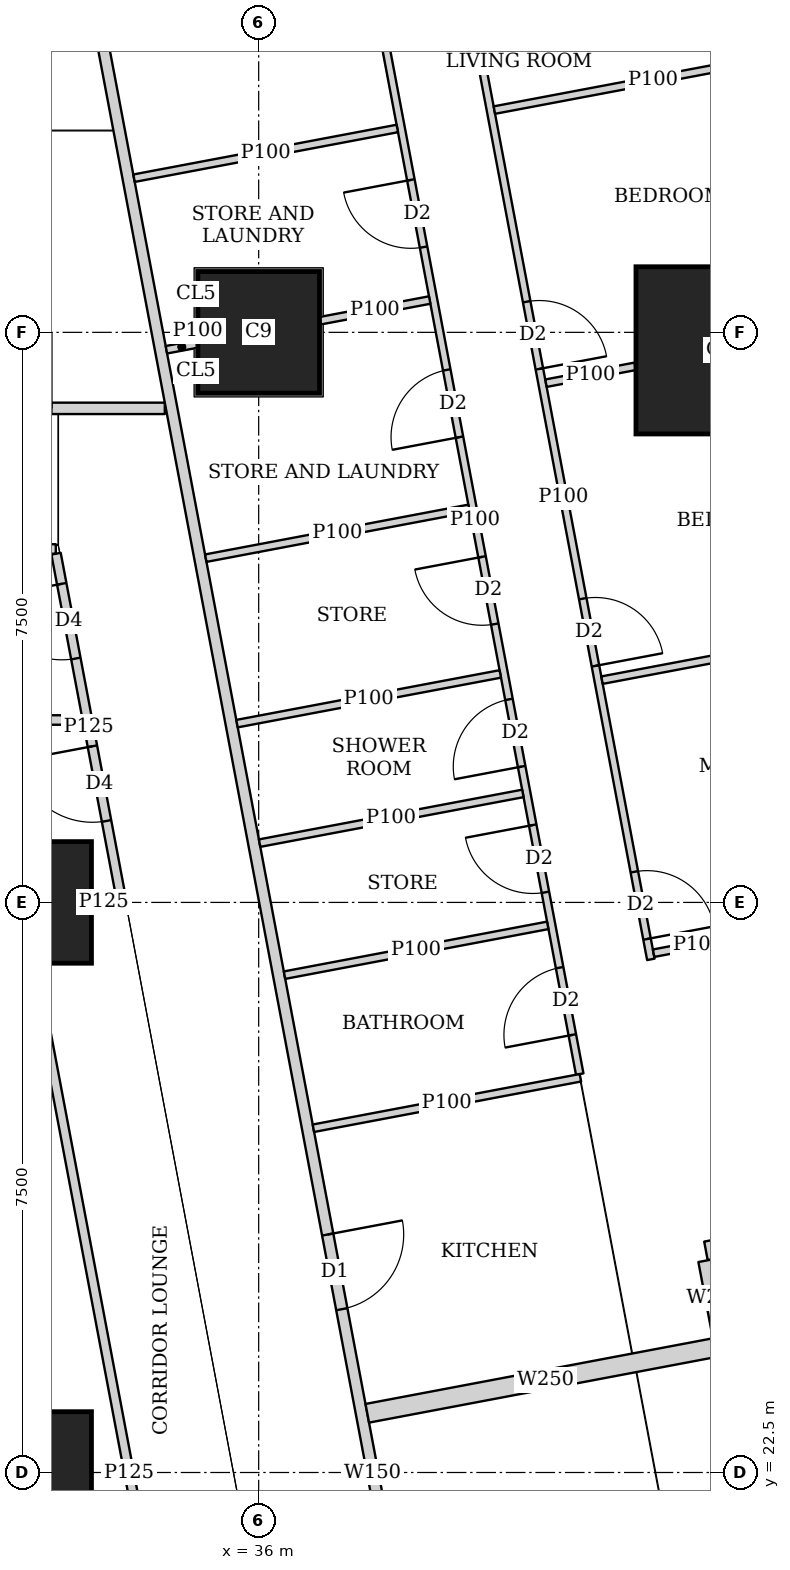
"""IFC4 building model, lengths in metres.
Left out: names, types, materials, properties, quantities, classifications, styles, units other than length and angle.
Written with IfcOpenShell. Run it as: python <this file> out.ifc"""

import sys

from ifc_helpers import new_model, si_unit, direction, frame, frame_2d, origin, origin_2d, place, context, subcontext, project, spatial, rectangle, extrude, element, fill, save


model = new_model("IFC4")
c1 = context("Model", 3, precision=1e-05, world=origin(), true_north=direction((0.0, 1.0)))
c2 = subcontext(c1, "Body", "Model", "MODEL_VIEW")
j1 = project(units=[si_unit("LENGTHUNIT", "METRE"), si_unit("PLANEANGLEUNIT", "RADIAN")], contexts=[c1])
p1 = place(None, origin())
s1 = spatial("IfcSite", under=j1, at=p1, CompositionType="ELEMENT")
p2 = place(p1, origin())
s2 = spatial("IfcBuilding", under=s1, at=p2, CompositionType="ELEMENT")
p3 = place(p2, frame((0.0, 0.0, 111.65)))
s3 = spatial("IfcBuildingStorey", under=s2, at=p3, CompositionType="ELEMENT", Elevation=111.65)
for number, where, z_axis, x_axis in (
    (1, (33.0, 22.5, 0.0), (0.0, 0.0, 1.0), (1.0, 0.0, 0.0)),
    (2, (33.0, 30.0, 0.0), (0.0, 0.0, 1.0), (1.0, 0.0, 0.0)),
    (3, (36.0, 37.5, 0.0), (0.0, 0.0, 1.0), (1.0, 0.0, 0.0)),
):
    element("IfcColumn", number, at=place(p3, frame(where, z_axis=z_axis, x_axis=x_axis)), inside=s3, PredefinedType="COLUMN", context=c2, shape_type="SweptSolid", body=[
        extrude(rectangle(XDim=1.6, YDim=1.6, at=origin_2d()), origin(), (0.0, 0.0, 1.0), 3.75),
    ])
p4 = place(p3, frame((42.064, 37.263, 0.0), z_axis=(0.0, 0.0, 1.0), x_axis=(1.0, 0.0, 0.0)))
e4 = element("IfcColumn", 4, at=p4, inside=s3, PredefinedType="COLUMN", context=c2, shape_type="SweptSolid", body=[
    extrude(rectangle(XDim=2.2, YDim=2.2, at=origin_2d()), origin(), (0.0, 0.0, 1.0), 3.75),
])
p5 = place(p3, frame((8.35, 36.5, 0.0), z_axis=(0.0, 0.0, 1.0), x_axis=(1.0, 0.0, 0.0)))
e5 = element("IfcWall", 5, at=p5, inside=s3, PredefinedType="SOLIDWALL", context=c2, shape_type="SweptSolid", body=[
    extrude(rectangle(XDim=26.415, YDim=0.15, at=frame_2d((13.208, 0.0))), origin(), (0.0, 0.0, 1.0), 3.5),
])
p6 = place(p5, frame((2.6, 0.0, 0.0)))
e6 = element("IfcOpeningElement", 6, at=p6, cuts=e5, PredefinedType="OPENING", context=c2, shape_type="SweptSolid", body=[
    extrude(rectangle(XDim=1.0, YDim=2.1, at=frame_2d((0.5, 1.05))), frame((0.0, 0.085, 0.0), z_axis=(0.0, -1.0, 0.0), x_axis=(1.0, 0.0, 0.0)), (0.0, 0.0, 1.0), 0.17),
])
p7 = place(p5, frame((10.949, 0.0, 0.0)))
e7 = element("IfcOpeningElement", 7, at=p7, cuts=e5, PredefinedType="OPENING", context=c2, shape_type="SweptSolid", body=[
    extrude(rectangle(XDim=1.0, YDim=2.1, at=frame_2d((0.5, 1.05))), frame((0.0, 0.085, 0.0), z_axis=(0.0, -1.0, 0.0), x_axis=(1.0, 0.0, 0.0)), (0.0, 0.0, 1.0), 0.17),
])
p8 = place(p5, frame((23.923, 0.0, 0.0)))
e8 = element("IfcOpeningElement", 8, at=p8, cuts=e5, PredefinedType="OPENING", context=c2, shape_type="SweptSolid", body=[
    extrude(rectangle(XDim=1.0, YDim=2.1, at=frame_2d((0.5, 1.05))), frame((0.0, 0.085, 0.0), z_axis=(0.0, -1.0, 0.0), x_axis=(1.0, 0.0, 0.0)), (0.0, 0.0, 1.0), 0.17),
])
p9 = place(p3, frame((33.127, 45.65, 0.0), z_axis=(0.0, 0.0, 1.0), x_axis=(0.185598547723, -0.98262565562, 0.0)))
e9 = element("IfcWall", 9, at=p9, inside=s3, PredefinedType="SOLIDWALL", context=c2, shape_type="SweptSolid", body=[
    extrude(rectangle(XDim=47.118, YDim=0.15, at=frame_2d((23.559, 0.0))), origin(), (0.0, 0.0, 1.0), 2.2),
])
p10 = place(p9, frame((20.373, 0.0, 0.0)))
e10 = element("IfcOpeningElement", 10, at=p10, cuts=e9, PredefinedType="OPENING", context=c2, shape_type="SweptSolid", body=[
    extrude(rectangle(XDim=1.0, YDim=2.1, at=frame_2d((0.5, 1.05))), frame((0.0, 0.085, 0.0), z_axis=(0.0, -1.0, 0.0), x_axis=(1.0, 0.0, 0.0)), (0.0, 0.0, 1.0), 0.17),
])
p11 = place(p9, frame((24.188, 0.0, 0.0)))
e11 = element("IfcOpeningElement", 11, at=p11, cuts=e9, PredefinedType="OPENING", context=c2, shape_type="SweptSolid", body=[
    extrude(rectangle(XDim=1.0, YDim=2.1, at=frame_2d((0.5, 1.05))), frame((0.0, 0.085, 0.0), z_axis=(0.0, -1.0, 0.0), x_axis=(1.0, 0.0, 0.0)), (0.0, 0.0, 1.0), 0.17),
])
p12 = place(p9, frame((32.608, 0.0, 0.0)))
e12 = element("IfcOpeningElement", 12, at=p12, cuts=e9, PredefinedType="OPENING", context=c2, shape_type="SweptSolid", body=[
    extrude(rectangle(XDim=1.0, YDim=2.1, at=frame_2d((0.5, 1.05))), frame((0.0, 0.085, 0.0), z_axis=(0.0, -1.0, 0.0), x_axis=(1.0, 0.0, 0.0)), (0.0, 0.0, 1.0), 0.17),
])
p13 = place(p3, frame((38.862, 41.42, 0.0), z_axis=(0.0, 0.0, 1.0), x_axis=(0.185550092293, -0.982634806655, 0.0)))
e13 = element("IfcWall", 13, at=p13, inside=s3, PredefinedType="PARTITIONING", context=c2, shape_type="SweptSolid", body=[
    extrude(rectangle(XDim=12.384, YDim=0.1, at=frame_2d((6.192, 0.0))), origin(), (0.0, 0.0, 1.0), 2.5),
])
p14 = place(p13, frame((11.212, 0.0, 0.0)))
e14 = element("IfcOpeningElement", 14, at=p14, cuts=e13, PredefinedType="OPENING", context=c2, shape_type="SweptSolid", body=[
    extrude(rectangle(XDim=0.9, YDim=2.1, at=frame_2d((0.45, 1.05))), frame((0.0, 0.06, 0.0), z_axis=(0.0, -1.0, 0.0), x_axis=(1.0, 0.0, 0.0)), (0.0, 0.0, 1.0), 0.12),
])
p15 = place(p13, frame((7.555, 0.0, 0.0)))
e15 = element("IfcOpeningElement", 15, at=p15, cuts=e13, PredefinedType="OPENING", context=c2, shape_type="SweptSolid", body=[
    extrude(rectangle(XDim=0.9, YDim=2.1, at=frame_2d((0.45, 1.05))), frame((0.0, 0.06, 0.0), z_axis=(0.0, -1.0, 0.0), x_axis=(1.0, 0.0, 0.0)), (0.0, 0.0, 1.0), 0.12),
])
p16 = place(p13, frame((3.579, 0.0, 0.0)))
e16 = element("IfcOpeningElement", 16, at=p16, cuts=e13, PredefinedType="OPENING", context=c2, shape_type="SweptSolid", body=[
    extrude(rectangle(XDim=0.9, YDim=2.1, at=frame_2d((0.45, 1.05))), frame((0.0, 0.06, 0.0), z_axis=(0.0, -1.0, 0.0), x_axis=(1.0, 0.0, 0.0)), (0.0, 0.0, 1.0), 0.12),
])
p17 = place(p3, frame((37.473, 42.309, 0.0), z_axis=(0.0, 0.0, 1.0), x_axis=(0.185583982986, -0.982628406499, 0.0)))
e17 = element("IfcWall", 17, at=p17, inside=s3, PredefinedType="PARTITIONING", context=c2, shape_type="SweptSolid", body=[
    extrude(rectangle(XDim=14.825, YDim=0.1, at=frame_2d((7.412, 0.0))), origin(), (0.0, 0.0, 1.0), 2.5),
])
p18 = place(p17, frame((13.4, 0.0, 0.0)))
e18 = element("IfcOpeningElement", 18, at=p18, cuts=e17, PredefinedType="OPENING", context=c2, shape_type="SweptSolid", body=[
    extrude(rectangle(XDim=0.9, YDim=2.1, at=frame_2d((0.45, 1.05))), frame((0.0, 0.06, 0.0), z_axis=(0.0, -1.0, 0.0), x_axis=(1.0, 0.0, 0.0)), (0.0, 0.0, 1.0), 0.12),
])
p19 = place(p17, frame((9.808, 0.0, 0.0)))
e19 = element("IfcOpeningElement", 19, at=p19, cuts=e17, PredefinedType="OPENING", context=c2, shape_type="SweptSolid", body=[
    extrude(rectangle(XDim=0.9, YDim=2.1, at=frame_2d((0.45, 1.05))), frame((0.0, 0.06, 0.0), z_axis=(0.0, -1.0, 0.0), x_axis=(1.0, 0.0, 0.0)), (0.0, 0.0, 1.0), 0.12),
])
p20 = place(p17, frame((5.397, 0.0, 0.0)))
e20 = element("IfcOpeningElement", 20, at=p20, cuts=e17, PredefinedType="OPENING", context=c2, shape_type="SweptSolid", body=[
    extrude(rectangle(XDim=0.9, YDim=2.1, at=frame_2d((0.45, 1.05))), frame((0.0, 0.06, 0.0), z_axis=(0.0, -1.0, 0.0), x_axis=(1.0, 0.0, 0.0)), (0.0, 0.0, 1.0), 0.12),
])
p21 = place(p17, frame((2.853, 0.0, 0.0)))
e21 = element("IfcOpeningElement", 21, at=p21, cuts=e17, PredefinedType="OPENING", context=c2, shape_type="SweptSolid", body=[
    extrude(rectangle(XDim=0.9, YDim=2.1, at=frame_2d((0.45, 1.05))), frame((0.0, 0.06, 0.0), z_axis=(0.0, -1.0, 0.0), x_axis=(1.0, 0.0, 0.0)), (0.0, 0.0, 1.0), 0.12),
])
p22 = place(p17, frame((11.491, 0.0, 0.0)))
e22 = element("IfcOpeningElement", 22, at=p22, cuts=e17, PredefinedType="OPENING", context=c2, shape_type="SweptSolid", body=[
    extrude(rectangle(XDim=0.9, YDim=2.1, at=frame_2d((0.45, 1.05))), frame((0.0, 0.06, 0.0), z_axis=(0.0, -1.0, 0.0), x_axis=(1.0, 0.0, 0.0)), (0.0, 0.0, 1.0), 0.12),
])
p23 = place(p17, frame((7.9, 0.0, 0.0)))
e23 = element("IfcOpeningElement", 23, at=p23, cuts=e17, PredefinedType="OPENING", context=c2, shape_type="SweptSolid", body=[
    extrude(rectangle(XDim=0.9, YDim=2.1, at=frame_2d((0.45, 1.05))), frame((0.0, 0.06, 0.0), z_axis=(0.0, -1.0, 0.0), x_axis=(1.0, 0.0, 0.0)), (0.0, 0.0, 1.0), 0.12),
])
p24 = place(p3, frame((43.277, 41.212, 0.0), z_axis=(0.0, 0.0, 1.0), x_axis=(-0.982665405803, -0.185387972203, 0.0)))
e24 = element("IfcWall", 24, at=p24, inside=s3, PredefinedType="PARTITIONING", context=c2, shape_type="SweptSolid", body=[
    extrude(rectangle(XDim=4.25, YDim=0.1, at=frame_2d((2.125, 0.0))), origin(), (0.0, 0.0, 1.0), 2.05),
])
p25 = place(p3, frame((40.954, 37.053, 0.0), z_axis=(0.0, 0.0, 1.0), x_axis=(-0.982600492424, -0.185731721275, 0.0)))
e25 = element("IfcWall", 25, at=p25, inside=s3, PredefinedType="PARTITIONING", context=c2, shape_type="SweptSolid", body=[
    extrude(rectangle(XDim=1.195, YDim=0.1, at=frame_2d((0.597, 0.0))), origin(), (0.0, 0.0, 1.0), 2.05),
])
p26 = place(p3, frame((44.693, 33.713, 0.0), z_axis=(0.0, 0.0, 1.0), x_axis=(-0.982623519589, -0.185609856287, 0.0)))
e26 = element("IfcWall", 26, at=p26, inside=s3, PredefinedType="PARTITIONING", context=c2, shape_type="SweptSolid", body=[
    extrude(rectangle(XDim=4.25, YDim=0.1, at=frame_2d((2.125, 0.0))), origin(), (0.0, 0.0, 1.0), 2.2),
])
p27 = place(p3, frame((42.37, 29.554, 0.0), z_axis=(0.0, 0.0, 1.0), x_axis=(-0.982600492424, -0.185731721275, 0.0)))
e27 = element("IfcWall", 27, at=p27, inside=s3, PredefinedType="PARTITIONING", context=c2, shape_type="SweptSolid", body=[
    extrude(rectangle(XDim=1.195, YDim=0.1, at=frame_2d((0.597, 0.0))), origin(), (0.0, 0.0, 1.0), 2.5),
])
p28 = place(p3, frame((37.824, 40.182, 0.0), z_axis=(0.0, 0.0, 1.0), x_axis=(-0.982648794755, -0.185475998897, 0.0)))
e28 = element("IfcWall", 28, at=p28, inside=s3, PredefinedType="PARTITIONING", context=c2, shape_type="SweptSolid", body=[
    extrude(rectangle(XDim=3.525, YDim=0.1, at=frame_2d((1.763, 0.0))), origin(), (0.0, 0.0, 1.0), 3.5),
])
p29 = place(p3, frame((38.25, 37.925, 0.0), z_axis=(0.0, 0.0, 1.0), x_axis=(-0.982626127294, -0.185596050493, 0.0)))
e29 = element("IfcWall", 29, at=p29, inside=s3, PredefinedType="PARTITIONING", context=c2, shape_type="SweptSolid", body=[
    extrude(rectangle(XDim=1.465, YDim=0.1, at=frame_2d((0.733, 0.0))), origin(), (0.0, 0.0, 1.0), 3.5),
])
p30 = place(p3, frame((35.19, 37.347, 0.0), z_axis=(0.0, 0.0, 1.0), x_axis=(-0.982798158448, -0.184682916784, 0.0)))
e30 = element("IfcWall", 30, at=p30, inside=s3, PredefinedType="PARTITIONING", context=c2, shape_type="SweptSolid", body=[
    extrude(rectangle(XDim=0.411, YDim=0.1, at=frame_2d((0.206, 0.0))), origin(), (0.0, 0.0, 1.0), 3.5),
])
p31 = place(p3, frame((39.476, 31.434, 0.0), z_axis=(0.0, 0.0, 1.0), x_axis=(-0.982638553676, -0.185530247748, 0.0)))
e31 = element("IfcWall", 31, at=p31, inside=s3, PredefinedType="PARTITIONING", context=c2, shape_type="SweptSolid", body=[
    extrude(rectangle(XDim=3.525, YDim=0.1, at=frame_2d((1.763, 0.0))), origin(), (0.0, 0.0, 1.0), 3.5),
])
p32 = place(p3, frame((40.233, 27.693, 0.0), z_axis=(0.0, 0.0, 1.0), x_axis=(-0.982598214409, -0.185743772548, 0.0)))
e32 = element("IfcWall", 32, at=p32, inside=s3, PredefinedType="PARTITIONING", context=c2, shape_type="SweptSolid", body=[
    extrude(rectangle(XDim=3.575, YDim=0.1, at=frame_2d((1.788, 0.0))), origin(), (0.0, 0.0, 1.0), 3.5),
])
p33 = place(p3, frame((38.768, 35.184, 0.0), z_axis=(0.0, 0.0, 1.0), x_axis=(-0.982588017646, -0.185797706064, 0.0)))
e33 = element("IfcWall", 33, at=p33, inside=s3, PredefinedType="PARTITIONING", context=c2, shape_type="SweptSolid", body=[
    extrude(rectangle(XDim=3.525, YDim=0.1, at=frame_2d((1.763, 0.0))), origin(), (0.0, 0.0, 1.0), 3.5),
])
p34 = place(p3, frame((39.803, 29.698, 0.0), z_axis=(0.0, 0.0, 1.0), x_axis=(-0.982576058723, -0.185860939478, 0.0)))
e34 = element("IfcWall", 34, at=p34, inside=s3, PredefinedType="PARTITIONING", context=c2, shape_type="SweptSolid", body=[
    extrude(rectangle(XDim=3.524, YDim=0.1, at=frame_2d((1.762, 0.0))), origin(), (0.0, 0.0, 1.0), 2.5),
])
p35 = place(p3, frame((39.179, 33.006, 0.0), z_axis=(0.0, 0.0, 1.0), x_axis=(-0.982636169624, -0.185542874149, 0.0)))
e35 = element("IfcWall", 35, at=p35, inside=s3, PredefinedType="PARTITIONING", context=c2, shape_type="SweptSolid", body=[
    extrude(rectangle(XDim=3.525, YDim=0.1, at=frame_2d((1.763, 0.0))), origin(), (0.0, 0.0, 1.0), 3.5),
])
p36 = place(p3, frame((46.11, 26.213, 0.0), z_axis=(0.0, 0.0, 1.0), x_axis=(-0.982633535512, -0.185556823879, 0.0)))
e36 = element("IfcWall", 36, at=p36, inside=s3, PredefinedType="SOLIDWALL", context=c2, shape_type="SweptSolid", body=[
    extrude(rectangle(XDim=4.3, YDim=0.25, at=frame_2d((2.15, 0.0))), origin(), (0.0, 0.0, 1.0), 2.2),
])
p37 = place(p3, frame((42.121, 24.166, 0.0), z_axis=(0.0, 0.0, 1.0), x_axis=(-0.98259850169, -0.185742252804, 0.0)))
e37 = element("IfcWall", 37, at=p37, inside=s3, PredefinedType="SOLIDWALL", context=c2, shape_type="SweptSolid", body=[
    extrude(rectangle(XDim=4.775, YDim=0.25, at=frame_2d((2.388, 0.0))), origin(), (0.0, 0.0, 1.0), 3.5),
])
p38 = place(p3, frame((41.908, 25.292, 0.0), z_axis=(0.0, 0.0, 1.0), x_axis=(0.18607888991, -0.982534806879, 0.0)))
e38 = element("IfcWall", 38, at=p38, inside=s3, PredefinedType="SOLIDWALL", context=c2, shape_type="SweptSolid", body=[
    extrude(rectangle(XDim=1.021, YDim=0.25, at=frame_2d((0.51, 0.0))), origin(), (0.0, 0.0, 1.0), 3.5),
])
p39 = place(p3, frame((28.95, 34.65, 0.0), z_axis=(0.0, 0.0, 1.0), x_axis=(1.0, 0.0, 0.0)))
e39 = element("IfcWall", 39, at=p39, inside=s3, PredefinedType="PARTITIONING", context=c2, shape_type="SweptSolid", body=[
    extrude(rectangle(XDim=4.381, YDim=0.125, at=frame_2d((2.19, 0.0))), origin(), (0.0, 0.0, 1.0), 3.5),
])
p40 = place(p3, frame((34.193, 30.04, 0.0), z_axis=(0.0, 0.0, 1.0), x_axis=(-0.185626015863, 0.982620467034, 0.0)))
e40 = element("IfcWall", 40, at=p40, inside=s3, PredefinedType="PARTITIONING", context=c2, shape_type="SweptSolid", body=[
    extrude(rectangle(XDim=4.628, YDim=0.125, at=frame_2d((2.314, 0.0))), origin(), (0.0, 0.0, 1.0), 2.5),
])
p41 = place(p40, frame((1.05, 0.0, 0.0)))
e41 = element("IfcOpeningElement", 41, at=p41, cuts=e40, PredefinedType="OPENING", context=c2, shape_type="SweptSolid", body=[
    extrude(rectangle(XDim=1.0, YDim=2.1, at=frame_2d((0.5, 1.05))), frame((0.0, 0.073, 0.0), z_axis=(0.0, -1.0, 0.0), x_axis=(1.0, 0.0, 0.0)), (0.0, 0.0, 1.0), 0.145),
])
p42 = place(p40, frame((3.225, 0.0, 0.0)))
e42 = element("IfcOpeningElement", 42, at=p42, cuts=e40, PredefinedType="OPENING", context=c2, shape_type="SweptSolid", body=[
    extrude(rectangle(XDim=1.0, YDim=2.1, at=frame_2d((0.5, 1.05))), frame((0.0, 0.073, 0.0), z_axis=(0.0, -1.0, 0.0), x_axis=(1.0, 0.0, 0.0)), (0.0, 0.0, 1.0), 0.145),
])
p43 = place(p3, frame((35.557, 15.813, 0.0), z_axis=(0.0, 0.0, 1.0), x_axis=(-0.185583681679, 0.982628463405, 0.0)))
e43 = element("IfcWall", 43, at=p43, inside=s3, PredefinedType="PARTITIONING", context=c2, shape_type="SweptSolid", body=[
    extrude(rectangle(XDim=13.61, YDim=0.125, at=frame_2d((6.805, 0.0))), origin(), (0.0, 0.0, 1.0), 2.5),
])
p44 = place(p43, frame((5.1, 0.0, 0.0)))
e44 = element("IfcOpeningElement", 44, at=p44, cuts=e43, PredefinedType="OPENING", context=c2, shape_type="SweptSolid", body=[
    extrude(rectangle(XDim=1.0, YDim=2.1, at=frame_2d((0.5, 1.05))), frame((0.0, 0.073, 0.0), z_axis=(0.0, -1.0, 0.0), x_axis=(1.0, 0.0, 0.0)), (0.0, 0.0, 1.0), 0.145),
])
p45 = place(p3, frame((33.801, 30.0, 0.0), z_axis=(0.0, 0.0, 1.0), x_axis=(1.0, 0.0, 0.0)))
e45 = element("IfcWall", 45, at=p45, inside=s3, PredefinedType="PARTITIONING", context=c2, shape_type="SweptSolid", body=[
    extrude(rectangle(XDim=0.324, YDim=0.125, at=frame_2d((0.162, 0.0))), origin(), (0.0, 0.0, 1.0), 2.5),
])
p46 = place(p3, frame((28.95, 32.4, 0.0), z_axis=(0.0, 0.0, 1.0), x_axis=(1.0, 0.0, 0.0)))
e46 = element("IfcWall", 46, at=p46, inside=s3, PredefinedType="PARTITIONING", context=c2, shape_type="SweptSolid", body=[
    extrude(rectangle(XDim=4.722, YDim=0.125, at=frame_2d((2.361, 0.0))), origin(), (0.0, 0.0, 1.0), 3.5),
])
p47 = place(p14, origin())
e47 = element("IfcDoor", 47, at=p47, inside=s3, OperationType="SINGLE_SWING_RIGHT", PredefinedType="DOOR", context=c2, shape_type="SweptSolid", body=[
    extrude(rectangle(XDim=0.9, YDim=2.1, at=frame_2d((0.45, 1.05))), frame((0.0, 0.025, 0.0), z_axis=(0.0, -1.0, 0.0), x_axis=(1.0, 0.0, 0.0)), (0.0, 0.0, 1.0), 0.05),
])
fill(e14, e47)
p48 = place(p15, origin())
e48 = element("IfcDoor", 48, at=p48, inside=s3, OperationType="SINGLE_SWING_RIGHT", PredefinedType="DOOR", context=c2, shape_type="SweptSolid", body=[
    extrude(rectangle(XDim=0.9, YDim=2.1, at=frame_2d((0.45, 1.05))), frame((0.0, 0.025, 0.0), z_axis=(0.0, -1.0, 0.0), x_axis=(1.0, 0.0, 0.0)), (0.0, 0.0, 1.0), 0.05),
])
fill(e15, e48)
p49 = place(p16, origin())
e49 = element("IfcDoor", 49, at=p49, inside=s3, OperationType="SINGLE_SWING_RIGHT", PredefinedType="DOOR", context=c2, shape_type="SweptSolid", body=[
    extrude(rectangle(XDim=0.9, YDim=2.1, at=frame_2d((0.45, 1.05))), frame((0.0, 0.025, 0.0), z_axis=(0.0, -1.0, 0.0), x_axis=(1.0, 0.0, 0.0)), (0.0, 0.0, 1.0), 0.05),
])
fill(e16, e49)
p50 = place(p18, origin())
e50 = element("IfcDoor", 50, at=p50, inside=s3, OperationType="SINGLE_SWING_LEFT", PredefinedType="DOOR", context=c2, shape_type="SweptSolid", body=[
    extrude(rectangle(XDim=0.9, YDim=2.1, at=frame_2d((0.45, 1.05))), frame((0.0, 0.025, 0.0), z_axis=(0.0, -1.0, 0.0), x_axis=(1.0, 0.0, 0.0)), (0.0, 0.0, 1.0), 0.05),
])
fill(e18, e50)
p51 = place(p19, origin())
e51 = element("IfcDoor", 51, at=p51, inside=s3, OperationType="SINGLE_SWING_LEFT", PredefinedType="DOOR", context=c2, shape_type="SweptSolid", body=[
    extrude(rectangle(XDim=0.9, YDim=2.1, at=frame_2d((0.45, 1.05))), frame((0.0, 0.025, 0.0), z_axis=(0.0, -1.0, 0.0), x_axis=(1.0, 0.0, 0.0)), (0.0, 0.0, 1.0), 0.05),
])
fill(e19, e51)
p52 = place(p20, origin())
e52 = element("IfcDoor", 52, at=p52, inside=s3, OperationType="SINGLE_SWING_LEFT", PredefinedType="DOOR", context=c2, shape_type="SweptSolid", body=[
    extrude(rectangle(XDim=0.9, YDim=2.1, at=frame_2d((0.45, 1.05))), frame((0.0, 0.025, 0.0), z_axis=(0.0, -1.0, 0.0), x_axis=(1.0, 0.0, 0.0)), (0.0, 0.0, 1.0), 0.05),
])
fill(e20, e52)
p53 = place(p21, origin())
e53 = element("IfcDoor", 53, at=p53, inside=s3, OperationType="SINGLE_SWING_RIGHT", PredefinedType="DOOR", context=c2, shape_type="SweptSolid", body=[
    extrude(rectangle(XDim=0.9, YDim=2.1, at=frame_2d((0.45, 1.05))), frame((0.0, 0.025, 0.0), z_axis=(0.0, -1.0, 0.0), x_axis=(1.0, 0.0, 0.0)), (0.0, 0.0, 1.0), 0.05),
])
fill(e21, e53)
p54 = place(p22, origin())
e54 = element("IfcDoor", 54, at=p54, inside=s3, OperationType="SINGLE_SWING_RIGHT", PredefinedType="DOOR", context=c2, shape_type="SweptSolid", body=[
    extrude(rectangle(XDim=0.9, YDim=2.1, at=frame_2d((0.45, 1.05))), frame((0.0, 0.025, 0.0), z_axis=(0.0, -1.0, 0.0), x_axis=(1.0, 0.0, 0.0)), (0.0, 0.0, 1.0), 0.05),
])
fill(e22, e54)
p55 = place(p23, origin())
e55 = element("IfcDoor", 55, at=p55, inside=s3, OperationType="SINGLE_SWING_RIGHT", PredefinedType="DOOR", context=c2, shape_type="SweptSolid", body=[
    extrude(rectangle(XDim=0.9, YDim=2.1, at=frame_2d((0.45, 1.05))), frame((0.0, 0.025, 0.0), z_axis=(0.0, -1.0, 0.0), x_axis=(1.0, 0.0, 0.0)), (0.0, 0.0, 1.0), 0.05),
])
fill(e23, e55)
p56 = place(p10, origin())
e56 = element("IfcDoor", 56, at=p56, inside=s3, OperationType="SINGLE_SWING_LEFT", PredefinedType="DOOR", context=c2, shape_type="SweptSolid", body=[
    extrude(rectangle(XDim=1.0, YDim=2.1, at=frame_2d((0.5, 1.05))), frame((0.0, 0.025, 0.0), z_axis=(0.0, -1.0, 0.0), x_axis=(1.0, 0.0, 0.0)), (0.0, 0.0, 1.0), 0.05),
])
fill(e10, e56)
p57 = place(p41, origin())
e57 = element("IfcDoor", 57, at=p57, inside=s3, OperationType="SINGLE_SWING_RIGHT", PredefinedType="DOOR", context=c2, shape_type="SweptSolid", body=[
    extrude(rectangle(XDim=1.0, YDim=2.1, at=frame_2d((0.5, 1.05))), frame((0.0, 0.025, 0.0), z_axis=(0.0, -1.0, 0.0), x_axis=(1.0, 0.0, 0.0)), (0.0, 0.0, 1.0), 0.05),
])
fill(e41, e57)
p58 = place(p42, origin())
e58 = element("IfcDoor", 58, at=p58, inside=s3, OperationType="SINGLE_SWING_RIGHT", PredefinedType="DOOR", context=c2, shape_type="SweptSolid", body=[
    extrude(rectangle(XDim=1.0, YDim=2.1, at=frame_2d((0.5, 1.05))), frame((0.0, 0.025, 0.0), z_axis=(0.0, -1.0, 0.0), x_axis=(1.0, 0.0, 0.0)), (0.0, 0.0, 1.0), 0.05),
])
fill(e42, e58)
save(model, sys.argv[1])
